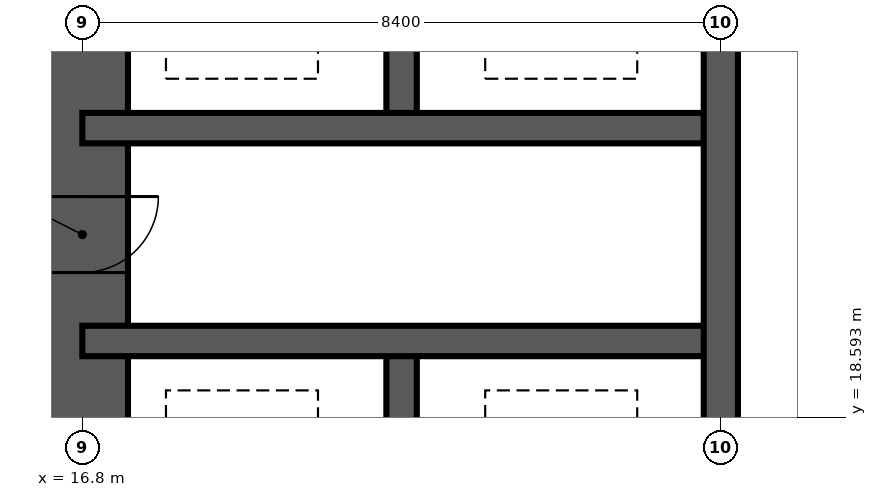
"""IFC4 building model, lengths in metres.
Left out: names, types, materials, properties, quantities, classifications, styles, units other than length and angle.
Written with IfcOpenShell. Run it as: python <this file> out.ifc"""

import sys

from ifc_helpers import new_model, si_unit, direction, frame, frame_2d, origin, place, context, subcontext, project, spatial, rectangle, extrude, element, fill, save


model = new_model("IFC4")
c1 = context("Model", 3, precision=1e-05, world=origin(), true_north=direction((0.0, 1.0)))
c2 = subcontext(c1, "Body", "Model", "MODEL_VIEW")
j1 = project(units=[si_unit("LENGTHUNIT", "METRE"), si_unit("PLANEANGLEUNIT", "RADIAN")], contexts=[c1])
p1 = place(None, origin())
s1 = spatial("IfcSite", under=j1, at=p1, CompositionType="ELEMENT")
p2 = place(p1, origin())
s2 = spatial("IfcBuilding", under=s1, at=p2, CompositionType="ELEMENT")
p3 = place(p2, frame((0.0, 0.0, 144.0)))
s3 = spatial("IfcBuildingStorey", under=s2, at=p3, CompositionType="ELEMENT", Elevation=144.0)
p4 = place(p3, frame((16.8, 41.4, -0.35), z_axis=(0.0, 0.0, 1.0), x_axis=(0.0, -1.0, 0.0)))
e1 = element("IfcWall", 1, at=p4, inside=s3, PredefinedType="SHEAR", context=c2, shape_type="SweptSolid", body=[
    extrude(rectangle(XDim=24.0, YDim=1.2, at=frame_2d((12.0, 0.0))), origin(), (0.0, 0.0, 1.0), 3.6),
])
p5 = place(p4, frame((11.1, 0.0, 0.35)))
e2 = element("IfcOpeningElement", 2, at=p5, cuts=e1, PredefinedType="OPENING", context=c2, shape_type="SweptSolid", body=[
    extrude(rectangle(XDim=1.8, YDim=2.2, at=frame_2d((0.9, 1.1))), frame((0.0, 0.61, 0.0), z_axis=(0.0, -1.0, 0.0), x_axis=(1.0, 0.0, 0.0)), (0.0, 0.0, 1.0), 1.22),
])
p6 = place(p4, frame((19.9, 0.0, 0.35)))
e3 = element("IfcOpeningElement", 3, at=p6, cuts=e1, PredefinedType="OPENING", context=c2, shape_type="SweptSolid", body=[
    extrude(rectangle(XDim=1.0, YDim=2.1, at=frame_2d((0.5, 1.05))), frame((0.0, 0.61, 0.0), z_axis=(0.0, -1.0, 0.0), x_axis=(1.0, 0.0, 0.0)), (0.0, 0.0, 1.0), 1.22),
])
p7 = place(p4, frame((5.2, 0.0, 0.35)))
e4 = element("IfcOpeningElement", 4, at=p7, cuts=e1, PredefinedType="OPENING", context=c2, shape_type="SweptSolid", body=[
    extrude(rectangle(XDim=1.0, YDim=2.1, at=frame_2d((0.5, 1.05))), frame((0.0, 0.61, 0.0), z_axis=(0.0, -1.0, 0.0), x_axis=(1.0, 0.0, 0.0)), (0.0, 0.0, 1.0), 1.22),
])
p8 = place(p3, frame((21.0, 16.8, -0.35), z_axis=(0.0, 0.0, 1.0), x_axis=(0.0, 1.0, 0.0)))
e5 = element("IfcWall", 5, at=p8, inside=s3, PredefinedType="SHEAR", context=c2, shape_type="SweptSolid", body=[
    extrude(rectangle(XDim=2.8, YDim=0.4, at=frame_2d((1.4, 0.0))), origin(), (0.0, 0.0, 1.0), 3.6),
])
p9 = place(p3, frame((21.0, 22.4, -0.35), z_axis=(0.0, 0.0, 1.0), x_axis=(0.0, 1.0, 0.0)))
e6 = element("IfcWall", 6, at=p9, inside=s3, PredefinedType="SHEAR", context=c2, shape_type="SweptSolid", body=[
    extrude(rectangle(XDim=5.6, YDim=0.4, at=frame_2d((2.8, 0.0))), origin(), (0.0, 0.0, 1.0), 3.6),
])
for number, where, z_axis, x_axis in (
    (7, (16.8, 19.6, -0.35), (0.0, 0.0, 1.0), (1.0, 0.0, 0.0)),
    (8, (16.8, 22.4, -0.35), (0.0, 0.0, 1.0), (1.0, 0.0, 0.0)),
):
    element("IfcWall", number, at=place(p3, frame(where, z_axis=z_axis, x_axis=x_axis)), inside=s3, PredefinedType="SHEAR", context=c2, shape_type="SweptSolid", body=[
        extrude(rectangle(XDim=8.4, YDim=0.4, at=frame_2d((4.2, 0.0))), origin(), (0.0, 0.0, 1.0), 3.6),
    ])
p10 = place(p3, frame((25.2, 16.8, -0.35), z_axis=(0.0, 0.0, 1.0), x_axis=(0.0, 1.0, 0.0)))
e9 = element("IfcWall", 9, at=p10, inside=s3, PredefinedType="SHEAR", context=c2, shape_type="SweptSolid", body=[
    extrude(rectangle(XDim=25.2, YDim=0.45, at=frame_2d((12.6, 0.0))), origin(), (0.0, 0.0, 1.0), 3.6),
])
p11 = place(p10, frame((12.1, 0.0, 0.35)))
e10 = element("IfcOpeningElement", 10, at=p11, cuts=e9, PredefinedType="OPENING", context=c2, shape_type="SweptSolid", body=[
    extrude(rectangle(XDim=1.0, YDim=2.1, at=frame_2d((0.5, 1.05))), frame((0.0, 0.235, 0.0), z_axis=(0.0, -1.0, 0.0), x_axis=(1.0, 0.0, 0.0)), (0.0, 0.0, 1.0), 0.47),
])
p12 = place(p6, origin())
e11 = element("IfcDoor", 11, at=p12, inside=s3, OperationType="SINGLE_SWING_LEFT", PredefinedType="DOOR", context=c2, shape_type="SweptSolid", body=[
    extrude(rectangle(XDim=1.0, YDim=2.1, at=frame_2d((0.5, 1.05))), frame((0.0, 0.025, 0.0), z_axis=(0.0, -1.0, 0.0), x_axis=(1.0, 0.0, 0.0)), (0.0, 0.0, 1.0), 0.05),
])
fill(e3, e11)
save(model, sys.argv[1])
